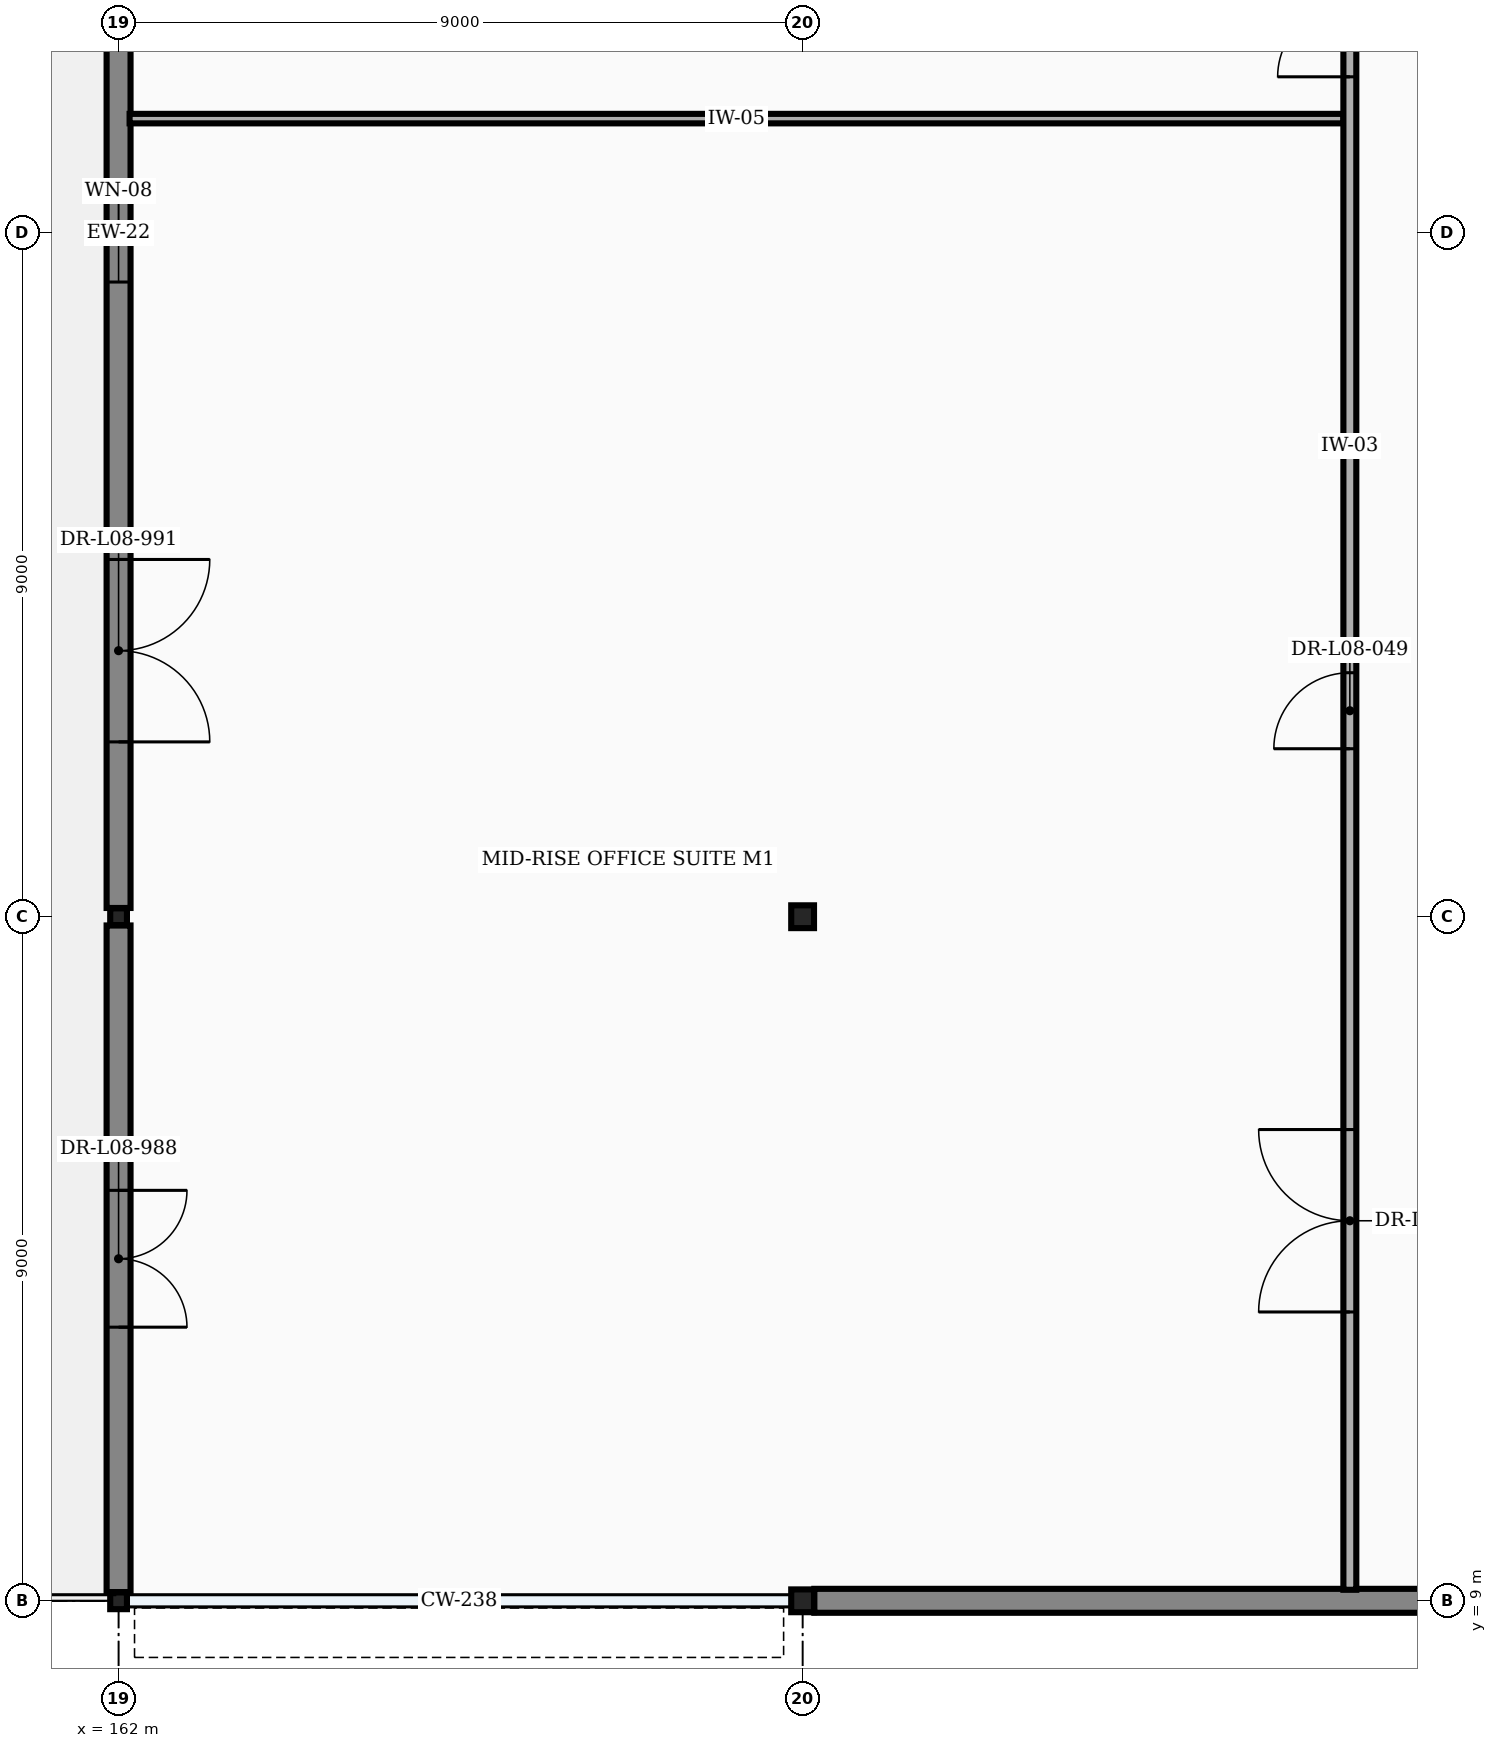
"""IFC4 building model, lengths in metres.
Left out: names, types, materials, properties, quantities, classifications, styles, units other than length and angle.
Written with IfcOpenShell. Run it as: python <this file> out.ifc"""

import sys

from ifc_helpers import new_model, si_unit, direction, frame, frame_2d, origin, origin_2d, place, context, subcontext, project, spatial, rectangle, hollow_rectangle, extrude, element, fill, save


model = new_model("IFC4")
c1 = context("Model", 3, precision=1e-05, world=origin(), true_north=direction((0.0, 1.0)))
c2 = subcontext(c1, "Body", "Model", "MODEL_VIEW")
j1 = project(units=[si_unit("LENGTHUNIT", "METRE"), si_unit("PLANEANGLEUNIT", "RADIAN")], contexts=[c1])
p1 = place(None, origin())
s1 = spatial("IfcSite", under=j1, at=p1, CompositionType="ELEMENT")
p2 = place(p1, origin())
s2 = spatial("IfcBuilding", under=s1, at=p2, CompositionType="ELEMENT")
p3 = place(p2, frame((0.0, 0.0, 37.8)))
s3 = spatial("IfcBuildingStorey", under=s2, at=p3, CompositionType="ELEMENT", Elevation=37.8)
for number, where, z_axis, x_axis in (
    (1, (162.0, 9.0, 0.0), (0.0, 0.0, 1.0), (1.0, 0.0, 0.0)),
    (2, (162.0, 18.0, 0.0), (0.0, 0.0, 1.0), (1.0, 0.0, 0.0)),
):
    element("IfcColumn", number, at=place(p3, frame(where, z_axis=z_axis, x_axis=x_axis)), inside=s3, PredefinedType="COLUMN", context=c2, shape_type="SweptSolid", body=[
        extrude(hollow_rectangle(XDim=0.22, YDim=0.22, WallThickness=0.01, at=origin_2d()), origin(), (0.0, 0.0, 1.0), 3.9),
    ])
for number, where, z_axis, x_axis in (
    (3, (171.0, 9.0, 0.0), (0.0, 0.0, 1.0), (1.0, 0.0, 0.0)),
    (4, (171.0, 18.0, 0.0), (0.0, 0.0, 1.0), (1.0, 0.0, 0.0)),
):
    element("IfcColumn", number, at=place(p3, frame(where, z_axis=z_axis, x_axis=x_axis)), inside=s3, PredefinedType="COLUMN", context=c2, shape_type="SweptSolid", body=[
        extrude(hollow_rectangle(XDim=0.3, YDim=0.3, WallThickness=0.012, at=origin_2d()), origin(), (0.0, 0.0, 1.0), 3.9),
    ])
p4 = place(p3, frame((171.154, 9.0, 0.0), z_axis=(0.0, 0.0, 1.0), x_axis=(1.0, 0.0, 0.0)))
e5 = element("IfcWall", 5, at=p4, inside=s3, PredefinedType="STANDARD", context=c2, shape_type="SweptSolid", body=[
    extrude(rectangle(XDim=17.692, YDim=0.315, at=frame_2d((8.846, 0.0))), origin(), (0.0, 0.0, 1.0), 2.803),
])
p5 = place(p4, frame((8.196, 0.0, 0.7)))
e6 = element("IfcOpeningElement", 6, at=p5, cuts=e5, PredefinedType="OPENING", context=c2, shape_type="SweptSolid", body=[
    extrude(rectangle(XDim=1.3, YDim=1.9, at=frame_2d((0.65, 0.95))), frame((0.0, 0.169, 0.0), z_axis=(0.0, -1.0, 0.0), x_axis=(1.0, 0.0, 0.0)), (0.0, 0.0, 1.0), 0.339),
])
p6 = place(p3, frame((162.0, 9.115, 0.0), z_axis=(0.0, 0.0, 1.0), x_axis=(0.0, 1.0, 0.0)))
e7 = element("IfcWall", 7, at=p6, inside=s3, PredefinedType="STANDARD", context=c2, shape_type="SweptSolid", body=[
    extrude(rectangle(XDim=8.77, YDim=0.315, at=frame_2d((4.385, 0.0))), origin(), (0.0, 0.0, 1.0), 3.565),
])
p7 = place(p6, frame((3.485, 0.0, 0.0)))
e8 = element("IfcOpeningElement", 8, at=p7, cuts=e7, PredefinedType="OPENING", context=c2, shape_type="SweptSolid", body=[
    extrude(rectangle(XDim=1.8, YDim=2.3, at=frame_2d((0.9, 1.15))), frame((0.0, 0.169, 0.0), z_axis=(0.0, -1.0, 0.0), x_axis=(1.0, 0.0, 0.0)), (0.0, 0.0, 1.0), 0.339),
])
p8 = place(p3, frame((162.0, 18.115, 0.0), z_axis=(0.0, 0.0, 1.0), x_axis=(0.0, 1.0, 0.0)))
e9 = element("IfcWall", 9, at=p8, inside=s3, PredefinedType="STANDARD", context=c2, shape_type="SweptSolid", body=[
    extrude(rectangle(XDim=17.77, YDim=0.315, at=frame_2d((8.885, 0.0))), origin(), (0.0, 0.0, 1.0), 2.953),
])
p9 = place(p8, frame((8.235, 0.0, 0.7)))
e10 = element("IfcOpeningElement", 10, at=p9, cuts=e9, PredefinedType="OPENING", context=c2, shape_type="SweptSolid", body=[
    extrude(rectangle(XDim=1.3, YDim=1.9, at=frame_2d((0.65, 0.95))), frame((0.0, 0.169, 0.0), z_axis=(0.0, -1.0, 0.0), x_axis=(1.0, 0.0, 0.0)), (0.0, 0.0, 1.0), 0.339),
])
p10 = place(p8, frame((2.185, 0.0, 0.0)))
e11 = element("IfcOpeningElement", 11, at=p10, cuts=e9, PredefinedType="OPENING", context=c2, shape_type="SweptSolid", body=[
    extrude(rectangle(XDim=2.4, YDim=2.35, at=frame_2d((1.2, 1.175))), frame((0.0, 0.169, 0.0), z_axis=(0.0, -1.0, 0.0), x_axis=(1.0, 0.0, 0.0)), (0.0, 0.0, 1.0), 0.339),
])
p11 = place(p3, frame((162.145, 28.5, 0.0), z_axis=(0.0, 0.0, 1.0), x_axis=(1.0, 0.0, 0.0)))
e12 = element("IfcWall", 12, at=p11, inside=s3, PredefinedType="PARTITIONING", context=c2, shape_type="SweptSolid", body=[
    extrude(rectangle(XDim=15.97, YDim=0.125, at=frame_2d((7.985, 0.0))), origin(), (0.0, 0.0, 1.0), 3.565),
])
p12 = place(p3, frame((178.2, 9.145, 0.0), z_axis=(0.0, 0.0, 1.0), x_axis=(0.0, 1.0, 0.0)))
e13 = element("IfcWall", 13, at=p12, inside=s3, PredefinedType="PARTITIONING", context=c2, shape_type="SweptSolid", body=[
    extrude(rectangle(XDim=30.095, YDim=0.17, at=frame_2d((15.047, 0.0))), origin(), (0.0, 0.0, 1.0), 3.565),
])
p13 = place(p12, frame((11.065, 0.0, 0.0)))
e14 = element("IfcOpeningElement", 14, at=p13, cuts=e13, PredefinedType="OPENING", context=c2, shape_type="SweptSolid", body=[
    extrude(rectangle(XDim=1.0, YDim=2.15, at=frame_2d((0.5, 1.075))), frame((0.0, 0.097, 0.0), z_axis=(0.0, -1.0, 0.0), x_axis=(1.0, 0.0, 0.0)), (0.0, 0.0, 1.0), 0.194),
])
p14 = place(p12, frame((3.655, 0.0, 0.0)))
e15 = element("IfcOpeningElement", 15, at=p14, cuts=e13, PredefinedType="OPENING", context=c2, shape_type="SweptSolid", body=[
    extrude(rectangle(XDim=2.4, YDim=2.35, at=frame_2d((1.2, 1.175))), frame((0.0, 0.097, 0.0), z_axis=(0.0, -1.0, 0.0), x_axis=(1.0, 0.0, 0.0)), (0.0, 0.0, 1.0), 0.194),
])
p15 = place(p12, frame((28.465, 0.0, 0.0)))
e16 = element("IfcOpeningElement", 16, at=p15, cuts=e13, PredefinedType="OPENING", context=c2, shape_type="SweptSolid", body=[
    extrude(rectangle(XDim=1.15, YDim=2.15, at=frame_2d((0.575, 1.075))), frame((0.0, 0.097, 0.0), z_axis=(0.0, -1.0, 0.0), x_axis=(1.0, 0.0, 0.0)), (0.0, 0.0, 1.0), 0.194),
])
p16 = place(p12, frame((19.905, 0.0, 0.0)))
e17 = element("IfcOpeningElement", 17, at=p16, cuts=e13, PredefinedType="OPENING", context=c2, shape_type="SweptSolid", body=[
    extrude(rectangle(XDim=1.9, YDim=2.35, at=frame_2d((0.95, 1.175))), frame((0.0, 0.097, 0.0), z_axis=(0.0, -1.0, 0.0), x_axis=(1.0, 0.0, 0.0)), (0.0, 0.0, 1.0), 0.194),
])
p17 = place(p7, frame((1.8, 0.0, 0.0), z_axis=(0.0, 0.0, 1.0), x_axis=(-1.0, 0.0, 0.0)))
e18 = element("IfcDoor", 18, at=p17, inside=s3, OperationType="DOUBLE_DOOR_SINGLE_SWING", PredefinedType="DOOR", context=c2, shape_type="SweptSolid", body=[
    extrude(rectangle(XDim=1.8, YDim=2.3, at=frame_2d((0.9, 1.15))), frame((0.0, 0.025, 0.0), z_axis=(0.0, -1.0, 0.0), x_axis=(1.0, 0.0, 0.0)), (0.0, 0.0, 1.0), 0.05),
])
fill(e8, e18)
p18 = place(p9, origin())
e19 = element("IfcWindow", 19, at=p18, inside=s3, PartitioningType="SINGLE_PANEL", PredefinedType="WINDOW", context=c2, shape_type="SweptSolid", body=[
    extrude(rectangle(XDim=1.3, YDim=1.9, at=frame_2d((0.65, 0.95))), frame((0.0, 0.03, 0.0), z_axis=(0.0, -1.0, 0.0), x_axis=(1.0, 0.0, 0.0)), (0.0, 0.0, 1.0), 0.06),
])
fill(e10, e19)
p19 = place(p10, frame((2.4, 0.0, 0.0), z_axis=(0.0, 0.0, 1.0), x_axis=(-1.0, 0.0, 0.0)))
e20 = element("IfcDoor", 20, at=p19, inside=s3, OperationType="DOUBLE_DOOR_SINGLE_SWING", PredefinedType="DOOR", context=c2, shape_type="SweptSolid", body=[
    extrude(rectangle(XDim=2.4, YDim=2.35, at=frame_2d((1.2, 1.175))), frame((0.0, 0.025, 0.0), z_axis=(0.0, -1.0, 0.0), x_axis=(1.0, 0.0, 0.0)), (0.0, 0.0, 1.0), 0.05),
])
fill(e11, e20)
p20 = place(p13, origin())
e21 = element("IfcDoor", 21, at=p20, inside=s3, OperationType="SINGLE_SWING_LEFT", PredefinedType="DOOR", context=c2, shape_type="SweptSolid", body=[
    extrude(rectangle(XDim=1.0, YDim=2.15, at=frame_2d((0.5, 1.075))), frame((0.0, 0.025, 0.0), z_axis=(0.0, -1.0, 0.0), x_axis=(1.0, 0.0, 0.0)), (0.0, 0.0, 1.0), 0.05),
])
fill(e14, e21)
p21 = place(p14, origin())
e22 = element("IfcDoor", 22, at=p21, inside=s3, OperationType="DOUBLE_DOOR_SINGLE_SWING", PredefinedType="DOOR", context=c2, shape_type="SweptSolid", body=[
    extrude(rectangle(XDim=2.4, YDim=2.35, at=frame_2d((1.2, 1.175))), frame((0.0, 0.025, 0.0), z_axis=(0.0, -1.0, 0.0), x_axis=(1.0, 0.0, 0.0)), (0.0, 0.0, 1.0), 0.05),
])
fill(e15, e22)
p22 = place(p16, origin())
e23 = element("IfcDoor", 23, at=p22, inside=s3, OperationType="DOUBLE_DOOR_SINGLE_SWING", PredefinedType="DOOR", context=c2, shape_type="SweptSolid", body=[
    extrude(rectangle(XDim=1.9, YDim=2.35, at=frame_2d((0.95, 1.175))), frame((0.0, 0.025, 0.0), z_axis=(0.0, -1.0, 0.0), x_axis=(1.0, 0.0, 0.0)), (0.0, 0.0, 1.0), 0.05),
])
fill(e17, e23)
save(model, sys.argv[1])
